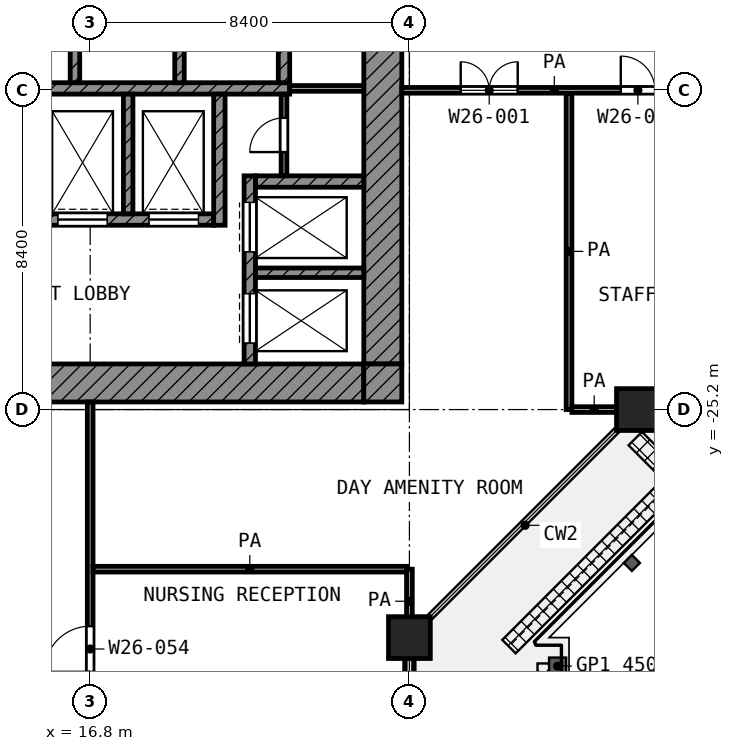
"""IFC4 building model, lengths in metres.
Left out: names, types, materials, properties, quantities, classifications, styles, units other than length and angle.
Written with IfcOpenShell. Run it as: python <this file> out.ifc"""

import sys

from ifc_helpers import new_model, si_unit, direction, frame, frame_2d, origin, origin_2d, place, context, subcontext, project, spatial, rectangle, extrude, element, fill, save


model = new_model("IFC4")
c1 = context("Model", 3, precision=1e-05, world=origin(), true_north=direction((0.0, 1.0)))
c2 = subcontext(c1, "Body", "Model", "MODEL_VIEW")
j1 = project(units=[si_unit("LENGTHUNIT", "METRE"), si_unit("PLANEANGLEUNIT", "RADIAN")], contexts=[c1])
p1 = place(None, origin())
s1 = spatial("IfcSite", under=j1, at=p1, CompositionType="ELEMENT")
p2 = place(p1, origin())
s2 = spatial("IfcBuilding", under=s1, at=p2, CompositionType="ELEMENT")
p3 = place(p2, frame((0.0, 0.0, 115.6)))
s3 = spatial("IfcBuildingStorey", under=s2, at=p3, CompositionType="ELEMENT", Elevation=115.6)
for number, where, z_axis, x_axis in (
    (1, (31.2, -25.2, 0.0), (0.0, 0.0, 1.0), (1.0, 0.0, 0.0)),
    (2, (25.2, -31.2, 0.0), (0.0, 0.0, 1.0), (1.0, 0.0, 0.0)),
):
    element("IfcColumn", number, at=place(p3, frame(where, z_axis=z_axis, x_axis=x_axis)), inside=s3, PredefinedType="COLUMN", context=c2, shape_type="SweptSolid", body=[
        extrude(rectangle(XDim=1.1, YDim=1.1, at=origin_2d()), origin(), (0.0, 0.0, 1.0), 4.2),
    ])
p4 = place(p3, frame((25.2, -34.992, 0.0), z_axis=(0.0, 0.0, 1.0), x_axis=(0.0, 1.0, 0.0)))
e3 = element("IfcWall", 3, at=p4, inside=s3, PredefinedType="SOLIDWALL", context=c2, shape_type="SweptSolid", body=[
    extrude(rectangle(XDim=3.242, YDim=0.25, at=frame_2d((1.621, 0.0))), origin(), (0.0, 0.0, 1.0), 3.48),
])
p5 = place(p4, frame((1.621, 0.0, 0.0)))
e4 = element("IfcOpeningElement", 4, at=p5, cuts=e3, PredefinedType="OPENING", context=c2, shape_type="SweptSolid", body=[
    extrude(rectangle(XDim=1.0, YDim=2.1, at=frame_2d((0.5, 1.05))), frame((0.0, 0.135, 0.0), z_axis=(0.0, -1.0, 0.0), x_axis=(1.0, 0.0, 0.0)), (0.0, 0.0, 1.0), 0.27),
])
p6 = place(p3, frame((24.5, -24.0, 0.0), z_axis=(0.0, 0.0, 1.0), x_axis=(0.0, 1.0, 0.0)))
e5 = element("IfcWall", 5, at=p6, inside=s3, PredefinedType="SHEAR", context=c2, shape_type="SweptSolid", body=[
    extrude(rectangle(XDim=18.6, YDim=1.0, at=frame_2d((9.3, 0.0))), origin(), (0.0, 0.0, 1.0), 3.6),
])
p7 = place(p6, frame((10.5, 0.0, 0.0)))
e6 = element("IfcOpeningElement", 6, at=p7, cuts=e5, PredefinedType="OPENING", context=c2, shape_type="SweptSolid", body=[
    extrude(rectangle(XDim=1.8, YDim=2.1, at=frame_2d((0.9, 1.05))), frame((0.0, 0.51, 0.0), z_axis=(0.0, -1.0, 0.0), x_axis=(1.0, 0.0, 0.0)), (0.0, 0.0, 1.0), 1.02),
])
p8 = place(p3, frame((5.4, -24.5, 0.0), z_axis=(0.0, 0.0, 1.0), x_axis=(1.0, 0.0, 0.0)))
e7 = element("IfcWall", 7, at=p8, inside=s3, PredefinedType="SHEAR", context=c2, shape_type="SweptSolid", body=[
    extrude(rectangle(XDim=18.6, YDim=1.0, at=frame_2d((9.3, 0.0))), origin(), (0.0, 0.0, 1.0), 3.6),
])
p9 = place(p8, frame((6.3, 0.0, 0.0)))
e8 = element("IfcOpeningElement", 8, at=p9, cuts=e7, PredefinedType="OPENING", context=c2, shape_type="SweptSolid", body=[
    extrude(rectangle(XDim=1.8, YDim=2.1, at=frame_2d((0.9, 1.05))), frame((0.0, 0.51, 0.0), z_axis=(0.0, -1.0, 0.0), x_axis=(1.0, 0.0, 0.0)), (0.0, 0.0, 1.0), 1.02),
])
p10 = place(p3, frame((24.5, -25.0, 0.0), z_axis=(0.0, 0.0, 1.0), x_axis=(0.0, 1.0, 0.0)))
e9 = element("IfcWall", 9, at=p10, inside=s3, PredefinedType="SHEAR", context=c2, shape_type="SweptSolid", body=[
    extrude(rectangle(XDim=1.0, YDim=1.0, at=frame_2d((0.5, 0.0))), origin(), (0.0, 0.0, 1.0), 3.6),
])
p11 = place(p3, frame((5.4, -16.75, 0.0), z_axis=(0.0, 0.0, 1.0), x_axis=(1.0, 0.0, 0.0)))
e10 = element("IfcWall", 10, at=p11, inside=s3, PredefinedType="SHEAR", context=c2, shape_type="SweptSolid", body=[
    extrude(rectangle(XDim=16.65, YDim=0.3, at=frame_2d((8.325, 0.0))), origin(), (0.0, 0.0, 1.0), 3.6),
])
p12 = place(p3, frame((5.4, -20.2, 0.0), z_axis=(0.0, 0.0, 1.0), x_axis=(1.0, 0.0, 0.0)))
e11 = element("IfcWall", 11, at=p12, inside=s3, PredefinedType="SHEAR", context=c2, shape_type="SweptSolid", body=[
    extrude(rectangle(XDim=14.65, YDim=0.3, at=frame_2d((7.325, 0.0))), origin(), (0.0, 0.0, 1.0), 3.6),
])
p13 = place(p12, frame((10.55, 0.0, 0.0)))
e12 = element("IfcOpeningElement", 12, at=p13, cuts=e11, PredefinedType="OPENING", context=c2, shape_type="SweptSolid", body=[
    extrude(rectangle(XDim=1.3, YDim=2.1, at=frame_2d((0.65, 1.05))), frame((0.0, 0.16, 0.0), z_axis=(0.0, -1.0, 0.0), x_axis=(1.0, 0.0, 0.0)), (0.0, 0.0, 1.0), 0.32),
])
p14 = place(p12, frame((12.95, 0.0, 0.0)))
e13 = element("IfcOpeningElement", 13, at=p14, cuts=e11, PredefinedType="OPENING", context=c2, shape_type="SweptSolid", body=[
    extrude(rectangle(XDim=1.3, YDim=2.1, at=frame_2d((0.65, 1.05))), frame((0.0, 0.16, 0.0), z_axis=(0.0, -1.0, 0.0), x_axis=(1.0, 0.0, 0.0)), (0.0, 0.0, 1.0), 0.32),
])
p15 = place(p12, frame((0.55, 0.0, 0.0)))
e14 = element("IfcOpeningElement", 14, at=p15, cuts=e11, PredefinedType="OPENING", context=c2, shape_type="SweptSolid", body=[
    extrude(rectangle(XDim=1.3, YDim=2.1, at=frame_2d((0.65, 1.05))), frame((0.0, 0.16, 0.0), z_axis=(0.0, -1.0, 0.0), x_axis=(1.0, 0.0, 0.0)), (0.0, 0.0, 1.0), 0.32),
])
p16 = place(p12, frame((2.95, 0.0, 0.0)))
e15 = element("IfcOpeningElement", 15, at=p16, cuts=e11, PredefinedType="OPENING", context=c2, shape_type="SweptSolid", body=[
    extrude(rectangle(XDim=1.3, YDim=2.1, at=frame_2d((0.65, 1.05))), frame((0.0, 0.16, 0.0), z_axis=(0.0, -1.0, 0.0), x_axis=(1.0, 0.0, 0.0)), (0.0, 0.0, 1.0), 0.32),
])
p17 = place(p12, frame((6.55, 0.0, 0.0)))
e16 = element("IfcOpeningElement", 16, at=p17, cuts=e11, PredefinedType="OPENING", context=c2, shape_type="SweptSolid", body=[
    extrude(rectangle(XDim=0.9, YDim=2.1, at=frame_2d((0.45, 1.05))), frame((0.0, 0.16, 0.0), z_axis=(0.0, -1.0, 0.0), x_axis=(1.0, 0.0, 0.0)), (0.0, 0.0, 1.0), 0.32),
])
p18 = place(p12, frame((8.95, 0.0, 0.0)))
e17 = element("IfcOpeningElement", 17, at=p18, cuts=e11, PredefinedType="OPENING", context=c2, shape_type="SweptSolid", body=[
    extrude(rectangle(XDim=0.9, YDim=2.1, at=frame_2d((0.45, 1.05))), frame((0.0, 0.16, 0.0), z_axis=(0.0, -1.0, 0.0), x_axis=(1.0, 0.0, 0.0)), (0.0, 0.0, 1.0), 0.32),
])
p19 = place(p3, frame((20.2, -20.35, 0.0), z_axis=(0.0, 0.0, 1.0), x_axis=(0.0, 1.0, 0.0)))
e18 = element("IfcWall", 18, at=p19, inside=s3, PredefinedType="SHEAR", context=c2, shape_type="SweptSolid", body=[
    extrude(rectangle(XDim=3.45, YDim=0.3, at=frame_2d((1.725, 0.0))), origin(), (0.0, 0.0, 1.0), 3.6),
])
p20 = place(p3, frame((21.9, -16.6, 0.0), z_axis=(0.0, 0.0, 1.0), x_axis=(0.0, 1.0, 0.0)))
e19 = element("IfcWall", 19, at=p20, inside=s3, PredefinedType="SHEAR", context=c2, shape_type="SweptSolid", body=[
    extrude(rectangle(XDim=2.35, YDim=0.3, at=frame_2d((1.175, 0.0))), origin(), (0.0, 0.0, 1.0), 3.6),
])
p21 = place(p3, frame((21.15, -19.2, 0.0), z_axis=(0.0, 0.0, 1.0), x_axis=(1.0, 0.0, 0.0)))
e20 = element("IfcWall", 20, at=p21, inside=s3, PredefinedType="SHEAR", context=c2, shape_type="SweptSolid", body=[
    extrude(rectangle(XDim=2.85, YDim=0.3, at=frame_2d((1.425, 0.0))), origin(), (0.0, 0.0, 1.0), 3.6),
])
p22 = place(p3, frame((21.0, -24.0, 0.0), z_axis=(0.0, 0.0, 1.0), x_axis=(0.0, 1.0, 0.0)))
e21 = element("IfcWall", 21, at=p22, inside=s3, PredefinedType="SHEAR", context=c2, shape_type="SweptSolid", body=[
    extrude(rectangle(XDim=4.95, YDim=0.3, at=frame_2d((2.475, 0.0))), origin(), (0.0, 0.0, 1.0), 3.6),
])
p23 = place(p22, frame((2.95, 0.0, 0.0)))
e22 = element("IfcOpeningElement", 22, at=p23, cuts=e21, PredefinedType="OPENING", context=c2, shape_type="SweptSolid", body=[
    extrude(rectangle(XDim=1.3, YDim=2.1, at=frame_2d((0.65, 1.05))), frame((0.0, 0.16, 0.0), z_axis=(0.0, -1.0, 0.0), x_axis=(1.0, 0.0, 0.0)), (0.0, 0.0, 1.0), 0.32),
])
p24 = place(p22, frame((0.55, 0.0, 0.0)))
e23 = element("IfcOpeningElement", 23, at=p24, cuts=e21, PredefinedType="OPENING", context=c2, shape_type="SweptSolid", body=[
    extrude(rectangle(XDim=1.3, YDim=2.1, at=frame_2d((0.65, 1.05))), frame((0.0, 0.16, 0.0), z_axis=(0.0, -1.0, 0.0), x_axis=(1.0, 0.0, 0.0)), (0.0, 0.0, 1.0), 0.32),
])
p25 = place(p3, frame((21.15, -21.6, 0.0), z_axis=(0.0, 0.0, 1.0), x_axis=(1.0, 0.0, 0.0)))
e24 = element("IfcWall", 24, at=p25, inside=s3, PredefinedType="SHEAR", context=c2, shape_type="SweptSolid", body=[
    extrude(rectangle(XDim=2.85, YDim=0.25, at=frame_2d((1.425, 0.0))), origin(), (0.0, 0.0, 1.0), 3.6),
])
p26 = place(p3, frame((17.8, -20.05, 0.0), z_axis=(0.0, 0.0, 1.0), x_axis=(0.0, 1.0, 0.0)))
e25 = element("IfcWall", 25, at=p26, inside=s3, PredefinedType="SHEAR", context=c2, shape_type="SweptSolid", body=[
    extrude(rectangle(XDim=3.15, YDim=0.25, at=frame_2d((1.575, 0.0))), origin(), (0.0, 0.0, 1.0), 3.6),
])
for number, where, z_axis, x_axis in (
    (26, (16.4, -16.6, 0.0), (0.0, 0.0, 1.0), (0.0, 1.0, 0.0)),
    (27, (19.15, -16.6, 0.0), (0.0, 0.0, 1.0), (0.0, 1.0, 0.0)),
):
    element("IfcWall", number, at=place(p3, frame(where, z_axis=z_axis, x_axis=x_axis)), inside=s3, PredefinedType="SHEAR", context=c2, shape_type="SweptSolid", body=[
        extrude(rectangle(XDim=2.35, YDim=0.25, at=frame_2d((1.175, 0.0))), origin(), (0.0, 0.0, 1.0), 3.6),
    ])
p27 = place(p3, frame((21.9, -19.05, 0.0), z_axis=(0.0, 0.0, 1.0), x_axis=(0.0, 1.0, 0.0)))
e28 = element("IfcWall", 28, at=p27, inside=s3, PredefinedType="PARTITIONING", context=c2, shape_type="SweptSolid", body=[
    extrude(rectangle(XDim=2.15, YDim=0.15, at=frame_2d((1.075, 0.0))), origin(), (0.0, 0.0, 1.0), 3.6),
])
p28 = place(p27, frame((0.625, 0.0, 0.0)))
e29 = element("IfcOpeningElement", 29, at=p28, cuts=e28, PredefinedType="OPENING", context=c2, shape_type="SweptSolid", body=[
    extrude(rectangle(XDim=0.9, YDim=2.1, at=frame_2d((0.45, 1.05))), frame((0.0, 0.085, 0.0), z_axis=(0.0, -1.0, 0.0), x_axis=(1.0, 0.0, 0.0)), (0.0, 0.0, 1.0), 0.17),
])
p29 = place(p3, frame((22.05, -16.75, 0.0), z_axis=(0.0, 0.0, 1.0), x_axis=(1.0, 0.0, 0.0)))
e30 = element("IfcWall", 30, at=p29, inside=s3, PredefinedType="PARTITIONING", context=c2, shape_type="SweptSolid", body=[
    extrude(rectangle(XDim=1.95, YDim=0.15, at=frame_2d((0.975, 0.0))), origin(), (0.0, 0.0, 1.0), 3.6),
])
p30 = place(p3, frame((16.875, -29.4, 0.0), z_axis=(0.0, 0.0, 1.0), x_axis=(1.0, 0.0, 0.0)))
e31 = element("IfcWall", 31, at=p30, inside=s3, PredefinedType="PARTITIONING", context=c2, shape_type="SweptSolid", body=[
    extrude(rectangle(XDim=8.25, YDim=0.15, at=frame_2d((4.125, 0.0))), origin(), (0.0, 0.0, 1.0), 3.6),
])
p31 = place(p3, frame((29.475, -25.2, 0.0), z_axis=(0.0, 0.0, 1.0), x_axis=(1.0, 0.0, 0.0)))
e32 = element("IfcWall", 32, at=p31, inside=s3, PredefinedType="PARTITIONING", context=c2, shape_type="SweptSolid", body=[
    extrude(rectangle(XDim=1.175, YDim=0.15, at=frame_2d((0.587, 0.0))), origin(), (0.0, 0.0, 1.0), 3.6),
])
p32 = place(p3, frame((25.0, -16.8, 0.0), z_axis=(0.0, 0.0, 1.0), x_axis=(1.0, 0.0, 0.0)))
e33 = element("IfcWall", 33, at=p32, inside=s3, PredefinedType="PARTITIONING", context=c2, shape_type="SweptSolid", body=[
    extrude(rectangle(XDim=8.025, YDim=0.15, at=frame_2d((4.012, 0.0))), origin(), (0.0, 0.0, 1.0), 3.6),
])
p33 = place(p32, frame((1.55, 0.0, 0.0)))
e34 = element("IfcOpeningElement", 34, at=p33, cuts=e33, PredefinedType="OPENING", context=c2, shape_type="SweptSolid", body=[
    extrude(rectangle(XDim=1.5, YDim=2.1, at=frame_2d((0.75, 1.05))), frame((0.0, 0.085, 0.0), z_axis=(0.0, -1.0, 0.0), x_axis=(1.0, 0.0, 0.0)), (0.0, 0.0, 1.0), 0.17),
])
p34 = place(p32, frame((5.762, 0.0, 0.0)))
e35 = element("IfcOpeningElement", 35, at=p34, cuts=e33, PredefinedType="OPENING", context=c2, shape_type="SweptSolid", body=[
    extrude(rectangle(XDim=0.9, YDim=2.1, at=frame_2d((0.45, 1.05))), frame((0.0, 0.085, 0.0), z_axis=(0.0, -1.0, 0.0), x_axis=(1.0, 0.0, 0.0)), (0.0, 0.0, 1.0), 0.17),
])
p35 = place(p3, frame((16.8, -58.72, 0.0), z_axis=(0.0, 0.0, 1.0), x_axis=(0.0, 1.0, 0.0)))
e36 = element("IfcWall", 36, at=p35, inside=s3, PredefinedType="PARTITIONING", context=c2, shape_type="SweptSolid", body=[
    extrude(rectangle(XDim=33.72, YDim=0.15, at=frame_2d((16.86, 0.0))), origin(), (0.0, 0.0, 1.0), 2.7),
])
p36 = place(p35, frame((26.62, 0.0, 0.0)))
e37 = element("IfcOpeningElement", 37, at=p36, cuts=e36, PredefinedType="OPENING", context=c2, shape_type="SweptSolid", body=[
    extrude(rectangle(XDim=1.2, YDim=2.1, at=frame_2d((0.6, 1.05))), frame((0.0, 0.085, 0.0), z_axis=(0.0, -1.0, 0.0), x_axis=(1.0, 0.0, 0.0)), (0.0, 0.0, 1.0), 0.17),
])
p37 = place(p35, frame((22.82, 0.0, 0.0)))
e38 = element("IfcOpeningElement", 38, at=p37, cuts=e36, PredefinedType="OPENING", context=c2, shape_type="SweptSolid", body=[
    extrude(rectangle(XDim=1.0, YDim=2.1, at=frame_2d((0.5, 1.05))), frame((0.0, 0.085, 0.0), z_axis=(0.0, -1.0, 0.0), x_axis=(1.0, 0.0, 0.0)), (0.0, 0.0, 1.0), 0.17),
])
p38 = place(p35, frame((17.92, 0.0, 0.0)))
e39 = element("IfcOpeningElement", 39, at=p38, cuts=e36, PredefinedType="OPENING", context=c2, shape_type="SweptSolid", body=[
    extrude(rectangle(XDim=1.2, YDim=2.1, at=frame_2d((0.6, 1.05))), frame((0.0, 0.085, 0.0), z_axis=(0.0, -1.0, 0.0), x_axis=(1.0, 0.0, 0.0)), (0.0, 0.0, 1.0), 0.17),
])
p39 = place(p35, frame((14.92, 0.0, 0.0)))
e40 = element("IfcOpeningElement", 40, at=p39, cuts=e36, PredefinedType="OPENING", context=c2, shape_type="SweptSolid", body=[
    extrude(rectangle(XDim=1.2, YDim=2.1, at=frame_2d((0.6, 1.05))), frame((0.0, 0.085, 0.0), z_axis=(0.0, -1.0, 0.0), x_axis=(1.0, 0.0, 0.0)), (0.0, 0.0, 1.0), 0.17),
])
p40 = place(p35, frame((9.02, 0.0, 0.0)))
e41 = element("IfcOpeningElement", 41, at=p40, cuts=e36, PredefinedType="OPENING", context=c2, shape_type="SweptSolid", body=[
    extrude(rectangle(XDim=1.2, YDim=2.1, at=frame_2d((0.6, 1.05))), frame((0.0, 0.085, 0.0), z_axis=(0.0, -1.0, 0.0), x_axis=(1.0, 0.0, 0.0)), (0.0, 0.0, 1.0), 0.17),
])
p41 = place(p35, frame((3.37, 0.0, 0.0)))
e42 = element("IfcOpeningElement", 42, at=p41, cuts=e36, PredefinedType="OPENING", context=c2, shape_type="SweptSolid", body=[
    extrude(rectangle(XDim=1.5, YDim=2.1, at=frame_2d((0.75, 1.05))), frame((0.0, 0.085, 0.0), z_axis=(0.0, -1.0, 0.0), x_axis=(1.0, 0.0, 0.0)), (0.0, 0.0, 1.0), 0.17),
])
p42 = place(p3, frame((25.2, -31.087, 0.0), z_axis=(0.0, 0.0, 1.0), x_axis=(0.0, 1.0, 0.0)))
e43 = element("IfcWall", 43, at=p42, inside=s3, PredefinedType="PARTITIONING", context=c2, shape_type="SweptSolid", body=[
    extrude(rectangle(XDim=1.687, YDim=0.15, at=frame_2d((0.844, 0.0))), origin(), (0.0, 0.0, 1.0), 3.6),
])
p43 = place(p3, frame((29.4, -25.2, 0.0), z_axis=(0.0, 0.0, 1.0), x_axis=(0.0, 1.0, 0.0)))
e44 = element("IfcWall", 44, at=p43, inside=s3, PredefinedType="PARTITIONING", context=c2, shape_type="SweptSolid", body=[
    extrude(rectangle(XDim=8.325, YDim=0.15, at=frame_2d((4.163, 0.0))), origin(), (0.0, 0.0, 1.0), 3.6),
])
p44 = place(p23, origin())
e45 = element("IfcDoor", 45, at=p44, inside=s3, OperationType="DOUBLE_DOOR_SLIDING", PredefinedType="DOOR", context=c2, shape_type="SweptSolid", body=[
    extrude(rectangle(XDim=1.3, YDim=2.1, at=frame_2d((0.65, 1.05))), frame((0.0, 0.025, 0.0), z_axis=(0.0, -1.0, 0.0), x_axis=(1.0, 0.0, 0.0)), (0.0, 0.0, 1.0), 0.05),
])
fill(e22, e45)
p45 = place(p24, origin())
e46 = element("IfcDoor", 46, at=p45, inside=s3, OperationType="DOUBLE_DOOR_SLIDING", PredefinedType="DOOR", context=c2, shape_type="SweptSolid", body=[
    extrude(rectangle(XDim=1.3, YDim=2.1, at=frame_2d((0.65, 1.05))), frame((0.0, 0.025, 0.0), z_axis=(0.0, -1.0, 0.0), x_axis=(1.0, 0.0, 0.0)), (0.0, 0.0, 1.0), 0.05),
])
fill(e23, e46)
p46 = place(p13, origin())
e47 = element("IfcDoor", 47, at=p46, inside=s3, OperationType="DOUBLE_DOOR_SLIDING", PredefinedType="DOOR", context=c2, shape_type="SweptSolid", body=[
    extrude(rectangle(XDim=1.3, YDim=2.1, at=frame_2d((0.65, 1.05))), frame((0.0, 0.025, 0.0), z_axis=(0.0, -1.0, 0.0), x_axis=(1.0, 0.0, 0.0)), (0.0, 0.0, 1.0), 0.05),
])
fill(e12, e47)
p47 = place(p14, origin())
e48 = element("IfcDoor", 48, at=p47, inside=s3, OperationType="DOUBLE_DOOR_SLIDING", PredefinedType="DOOR", context=c2, shape_type="SweptSolid", body=[
    extrude(rectangle(XDim=1.3, YDim=2.1, at=frame_2d((0.65, 1.05))), frame((0.0, 0.025, 0.0), z_axis=(0.0, -1.0, 0.0), x_axis=(1.0, 0.0, 0.0)), (0.0, 0.0, 1.0), 0.05),
])
fill(e13, e48)
p48 = place(p28, origin())
e49 = element("IfcDoor", 49, at=p48, inside=s3, OperationType="SINGLE_SWING_LEFT", PredefinedType="DOOR", context=c2, shape_type="SweptSolid", body=[
    extrude(rectangle(XDim=0.9, YDim=2.1, at=frame_2d((0.45, 1.05))), frame((0.0, 0.025, 0.0), z_axis=(0.0, -1.0, 0.0), x_axis=(1.0, 0.0, 0.0)), (0.0, 0.0, 1.0), 0.05),
])
fill(e29, e49)
p49 = place(p33, origin())
e50 = element("IfcDoor", 50, at=p49, inside=s3, OperationType="DOUBLE_DOOR_SINGLE_SWING", PredefinedType="DOOR", context=c2, shape_type="SweptSolid", body=[
    extrude(rectangle(XDim=1.5, YDim=2.1, at=frame_2d((0.75, 1.05))), frame((0.0, 0.025, 0.0), z_axis=(0.0, -1.0, 0.0), x_axis=(1.0, 0.0, 0.0)), (0.0, 0.0, 1.0), 0.05),
])
fill(e34, e50)
p50 = place(p34, origin())
e51 = element("IfcDoor", 51, at=p50, inside=s3, OperationType="SINGLE_SWING_LEFT", PredefinedType="DOOR", context=c2, shape_type="SweptSolid", body=[
    extrude(rectangle(XDim=0.9, YDim=2.1, at=frame_2d((0.45, 1.05))), frame((0.0, 0.025, 0.0), z_axis=(0.0, -1.0, 0.0), x_axis=(1.0, 0.0, 0.0)), (0.0, 0.0, 1.0), 0.05),
])
fill(e35, e51)
p51 = place(p36, origin())
e52 = element("IfcDoor", 52, at=p51, inside=s3, OperationType="SINGLE_SWING_LEFT", PredefinedType="DOOR", context=c2, shape_type="SweptSolid", body=[
    extrude(rectangle(XDim=1.2, YDim=2.1, at=frame_2d((0.6, 1.05))), frame((0.0, 0.025, 0.0), z_axis=(0.0, -1.0, 0.0), x_axis=(1.0, 0.0, 0.0)), (0.0, 0.0, 1.0), 0.05),
])
fill(e37, e52)
save(model, sys.argv[1])
